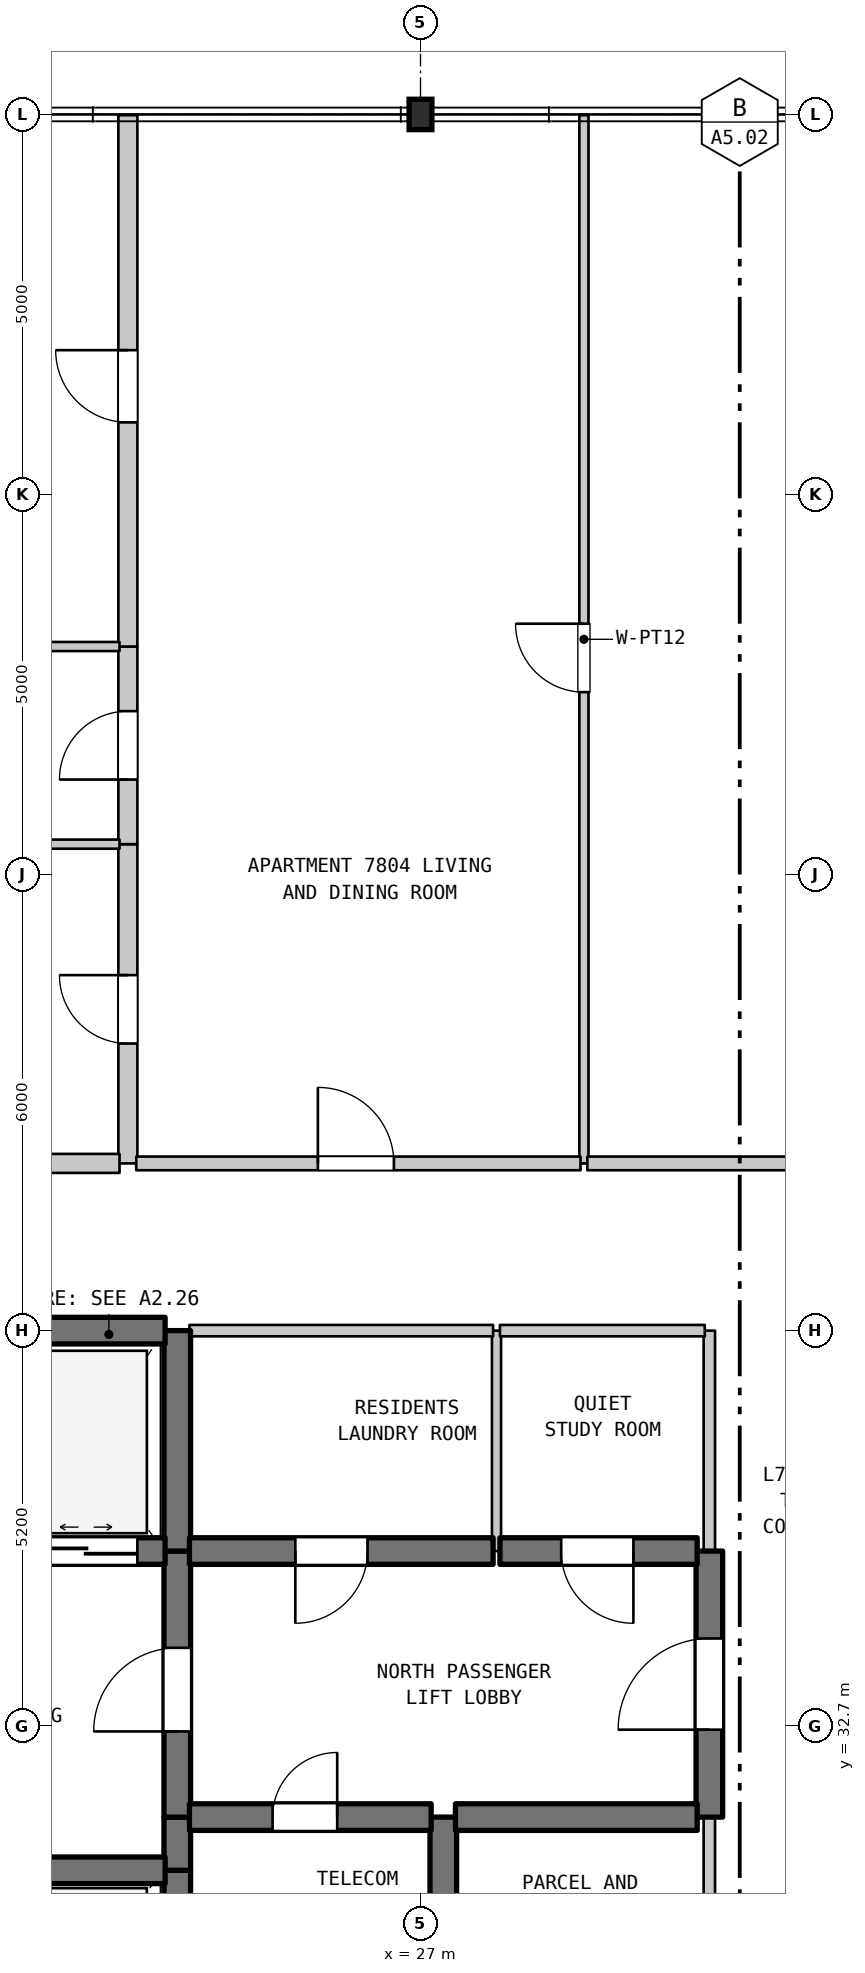
"""IFC4 building model, lengths in metres.
Left out: names, types, materials, properties, quantities, classifications, styles, units other than length and angle.
Written with IfcOpenShell. Run it as: python <this file> out.ifc"""

import sys

from ifc_helpers import new_model, si_unit, direction, frame, frame_2d, origin, origin_2d, place, context, subcontext, project, spatial, rectangle, i_section, extrude, element, fill, save


model = new_model("IFC4")
c1 = context("Model", 3, precision=1e-05, world=origin(), true_north=direction((0.0, 1.0)))
c2 = subcontext(c1, "Body", "Model", "MODEL_VIEW")
j1 = project(units=[si_unit("LENGTHUNIT", "METRE"), si_unit("PLANEANGLEUNIT", "RADIAN")], contexts=[c1])
p1 = place(None, origin())
s1 = spatial("IfcSite", under=j1, at=p1, CompositionType="ELEMENT")
p2 = place(p1, origin())
s2 = spatial("IfcBuilding", under=s1, at=p2, CompositionType="ELEMENT")
p3 = place(p2, frame((0.0, 0.0, 311.0)))
s3 = spatial("IfcBuildingStorey", under=s2, at=p3, CompositionType="ELEMENT", Elevation=311.0)
p4 = place(p3, frame((27.0, 53.9, 0.0), z_axis=(0.0, 0.0, 1.0), x_axis=(1.0, 0.0, 0.0)))
e1 = element("IfcColumn", 1, at=p4, inside=s3, PredefinedType="COLUMN", context=c2, shape_type="SweptSolid", body=[
    extrude(i_section(OverallWidth=0.3, OverallDepth=0.4, WebThickness=0.013, FlangeThickness=0.024, FilletRadius=0.027, at=origin_2d()), origin(), (0.0, 0.0, 1.0), 3.7),
])
p5 = place(p3, frame((23.15, 40.1, 0.0), z_axis=(0.0, 0.0, 1.0), x_axis=(0.0, 1.0, 0.0)))
e2 = element("IfcWall", 2, at=p5, inside=s3, PredefinedType="STANDARD", context=c2, shape_type="SweptSolid", body=[
    extrude(rectangle(XDim=4.2, YDim=0.25, at=frame_2d((2.1, 0.0))), origin(), (0.0, 0.0, 1.0), 3.28),
])
p6 = place(p5, frame((1.577, 0.0, 0.0)))
e3 = element("IfcOpeningElement", 3, at=p6, cuts=e2, PredefinedType="OPENING", context=c2, shape_type="SweptSolid", body=[
    extrude(rectangle(XDim=0.9, YDim=2.15, at=frame_2d((0.45, 1.075))), frame((0.0, 0.135, 0.0), z_axis=(0.0, -1.0, 0.0), x_axis=(1.0, 0.0, 0.0)), (0.0, 0.0, 1.0), 0.27),
])
p7 = place(p3, frame((23.15, 44.3, 0.0), z_axis=(0.0, 0.0, 1.0), x_axis=(0.0, 1.0, 0.0)))
e4 = element("IfcWall", 4, at=p7, inside=s3, PredefinedType="STANDARD", context=c2, shape_type="SweptSolid", body=[
    extrude(rectangle(XDim=2.6, YDim=0.25, at=frame_2d((1.3, 0.0))), origin(), (0.0, 0.0, 1.0), 3.28),
])
p8 = place(p7, frame((0.85, 0.0, 0.0)))
e5 = element("IfcOpeningElement", 5, at=p8, cuts=e4, PredefinedType="OPENING", context=c2, shape_type="SweptSolid", body=[
    extrude(rectangle(XDim=0.9, YDim=2.1, at=frame_2d((0.45, 1.05))), frame((0.0, 0.135, 0.0), z_axis=(0.0, -1.0, 0.0), x_axis=(1.0, 0.0, 0.0)), (0.0, 0.0, 1.0), 0.27),
])
p9 = place(p3, frame((23.15, 46.9, 0.0), z_axis=(0.0, 0.0, 1.0), x_axis=(0.0, 1.0, 0.0)))
e6 = element("IfcWall", 6, at=p9, inside=s3, PredefinedType="STANDARD", context=c2, shape_type="SweptSolid", body=[
    extrude(rectangle(XDim=6.99, YDim=0.25, at=frame_2d((3.495, 0.0))), origin(), (0.0, 0.0, 1.0), 3.28),
])
p10 = place(p9, frame((2.949, 0.0, 0.0)))
e7 = element("IfcOpeningElement", 7, at=p10, cuts=e6, PredefinedType="OPENING", context=c2, shape_type="SweptSolid", body=[
    extrude(rectangle(XDim=0.95, YDim=2.15, at=frame_2d((0.475, 1.075))), frame((0.0, 0.135, 0.0), z_axis=(0.0, -1.0, 0.0), x_axis=(1.0, 0.0, 0.0)), (0.0, 0.0, 1.0), 0.27),
])
p11 = place(p3, frame((23.8, 28.2, 0.0), z_axis=(0.0, 0.0, 1.0), x_axis=(0.0, 1.0, 0.0)))
e8 = element("IfcWall", 8, at=p11, inside=s3, PredefinedType="SHEAR", context=c2, shape_type="SweptSolid", body=[
    extrude(rectangle(XDim=2.6, YDim=0.35, at=frame_2d((1.3, 0.0))), origin(), (0.0, 0.0, 1.0), 3.28),
])
p12 = place(p3, frame((23.8, 30.8, 0.0), z_axis=(0.0, 0.0, 1.0), x_axis=(0.0, 1.0, 0.0)))
e9 = element("IfcWall", 9, at=p12, inside=s3, PredefinedType="SHEAR", context=c2, shape_type="SweptSolid", body=[
    extrude(rectangle(XDim=0.7, YDim=0.35, at=frame_2d((0.35, 0.0))), origin(), (0.0, 0.0, 1.0), 3.28),
])
p13 = place(p3, frame((23.8, 31.5, 0.0), z_axis=(0.0, 0.0, 1.0), x_axis=(0.0, 1.0, 0.0)))
e10 = element("IfcWall", 10, at=p13, inside=s3, PredefinedType="SHEAR", context=c2, shape_type="SweptSolid", body=[
    extrude(rectangle(XDim=3.5, YDim=0.35, at=frame_2d((1.75, 0.0))), origin(), (0.0, 0.0, 1.0), 3.28),
])
p14 = place(p13, frame((1.127, 0.0, 0.0)))
e11 = element("IfcOpeningElement", 11, at=p14, cuts=e10, PredefinedType="OPENING", context=c2, shape_type="SweptSolid", body=[
    extrude(rectangle(XDim=1.1, YDim=2.15, at=frame_2d((0.55, 1.075))), frame((0.0, 0.185, 0.0), z_axis=(0.0, -1.0, 0.0), x_axis=(1.0, 0.0, 0.0)), (0.0, 0.0, 1.0), 0.37),
])
p15 = place(p3, frame((23.8, 35.0, 0.0), z_axis=(0.0, 0.0, 1.0), x_axis=(0.0, 1.0, 0.0)))
e12 = element("IfcWall", 12, at=p15, inside=s3, PredefinedType="SHEAR", context=c2, shape_type="SweptSolid", body=[
    extrude(rectangle(XDim=2.9, YDim=0.35, at=frame_2d((1.45, 0.0))), origin(), (0.0, 0.0, 1.0), 3.28),
])
p16 = place(p3, frame((27.3, 28.9, 0.0), z_axis=(0.0, 0.0, 1.0), x_axis=(0.0, 1.0, 0.0)))
e13 = element("IfcWall", 13, at=p16, inside=s3, PredefinedType="SHEAR", context=c2, shape_type="SweptSolid", body=[
    extrude(rectangle(XDim=2.6, YDim=0.35, at=frame_2d((1.3, 0.0))), origin(), (0.0, 0.0, 1.0), 3.28),
])
p17 = place(p3, frame((28.0, 35.0, 0.0), z_axis=(0.0, 0.0, 1.0), x_axis=(0.0, 1.0, 0.0)))
e14 = element("IfcWall", 14, at=p17, inside=s3, PredefinedType="PARTITIONING", context=c2, shape_type="SweptSolid", body=[
    extrude(rectangle(XDim=2.9, YDim=0.12, at=frame_2d((1.45, 0.0))), origin(), (0.0, 0.0, 1.0), 3.28),
])
p18 = place(p3, frame((29.15, 40.1, 0.0), z_axis=(0.0, 0.0, 1.0), x_axis=(0.0, 1.0, 0.0)))
e15 = element("IfcWall", 15, at=p18, inside=s3, PredefinedType="PARTITIONING", context=c2, shape_type="SweptSolid", body=[
    extrude(rectangle(XDim=13.79, YDim=0.12, at=frame_2d((6.895, 0.0))), origin(), (0.0, 0.0, 1.0), 3.28),
])
p19 = place(p18, frame((6.2, 0.0, 0.0)))
e16 = element("IfcOpeningElement", 16, at=p19, cuts=e15, PredefinedType="OPENING", context=c2, shape_type="SweptSolid", body=[
    extrude(rectangle(XDim=0.9, YDim=2.15, at=frame_2d((0.45, 1.075))), frame((0.0, 0.07, 0.0), z_axis=(0.0, -1.0, 0.0), x_axis=(1.0, 0.0, 0.0)), (0.0, 0.0, 1.0), 0.14),
])
p20 = place(p3, frame((30.8, 28.9, 0.0), z_axis=(0.0, 0.0, 1.0), x_axis=(0.0, 1.0, 0.0)))
e17 = element("IfcWall", 17, at=p20, inside=s3, PredefinedType="STANDARD", context=c2, shape_type="SweptSolid", body=[
    extrude(rectangle(XDim=2.6, YDim=0.15, at=frame_2d((1.3, 0.0))), origin(), (0.0, 0.0, 1.0), 3.28),
])
p21 = place(p3, frame((30.8, 31.5, 0.0), z_axis=(0.0, 0.0, 1.0), x_axis=(0.0, 1.0, 0.0)))
e18 = element("IfcWall", 18, at=p21, inside=s3, PredefinedType="SHEAR", context=c2, shape_type="SweptSolid", body=[
    extrude(rectangle(XDim=3.5, YDim=0.35, at=frame_2d((1.75, 0.0))), origin(), (0.0, 0.0, 1.0), 3.28),
])
p22 = place(p21, frame((1.15, 0.0, 0.0)))
e19 = element("IfcOpeningElement", 19, at=p22, cuts=e18, PredefinedType="OPENING", context=c2, shape_type="SweptSolid", body=[
    extrude(rectangle(XDim=1.2, YDim=2.2, at=frame_2d((0.6, 1.1))), frame((0.0, 0.185, 0.0), z_axis=(0.0, -1.0, 0.0), x_axis=(1.0, 0.0, 0.0)), (0.0, 0.0, 1.0), 0.37),
])
p23 = place(p3, frame((30.8, 35.0, 0.0), z_axis=(0.0, 0.0, 1.0), x_axis=(0.0, 1.0, 0.0)))
e20 = element("IfcWall", 20, at=p23, inside=s3, PredefinedType="STANDARD", context=c2, shape_type="SweptSolid", body=[
    extrude(rectangle(XDim=2.9, YDim=0.15, at=frame_2d((1.45, 0.0))), origin(), (0.0, 0.0, 1.0), 3.28),
])
p24 = place(p3, frame((19.16, 30.8, 0.0), z_axis=(0.0, 0.0, 1.0), x_axis=(1.0, 0.0, 0.0)))
e21 = element("IfcWall", 21, at=p24, inside=s3, PredefinedType="SHEAR", context=c2, shape_type="SweptSolid", body=[
    extrude(rectangle(XDim=4.48, YDim=0.35, at=frame_2d((2.24, 0.0))), origin(), (0.0, 0.0, 1.0), 3.28),
])
p25 = place(p3, frame((23.96, 31.5, 0.0), z_axis=(0.0, 0.0, 1.0), x_axis=(1.0, 0.0, 0.0)))
e22 = element("IfcWall", 22, at=p25, inside=s3, PredefinedType="SHEAR", context=c2, shape_type="SweptSolid", body=[
    extrude(rectangle(XDim=3.18, YDim=0.35, at=frame_2d((1.59, 0.0))), origin(), (0.0, 0.0, 1.0), 3.28),
])
p26 = place(p25, frame((1.094, 0.0, 0.0)))
e23 = element("IfcOpeningElement", 23, at=p26, cuts=e22, PredefinedType="OPENING", context=c2, shape_type="SweptSolid", body=[
    extrude(rectangle(XDim=0.85, YDim=2.1, at=frame_2d((0.425, 1.05))), frame((0.0, 0.185, 0.0), z_axis=(0.0, -1.0, 0.0), x_axis=(1.0, 0.0, 0.0)), (0.0, 0.0, 1.0), 0.37),
])
p27 = place(p3, frame((27.46, 31.5, 0.0), z_axis=(0.0, 0.0, 1.0), x_axis=(1.0, 0.0, 0.0)))
e24 = element("IfcWall", 24, at=p27, inside=s3, PredefinedType="SHEAR", context=c2, shape_type="SweptSolid", body=[
    extrude(rectangle(XDim=3.18, YDim=0.35, at=frame_2d((1.59, 0.0))), origin(), (0.0, 0.0, 1.0), 3.28),
])
p28 = place(p3, frame((19.16, 35.0, 0.0), z_axis=(0.0, 0.0, 1.0), x_axis=(1.0, 0.0, 0.0)))
e25 = element("IfcWall", 25, at=p28, inside=s3, PredefinedType="SHEAR", context=c2, shape_type="SweptSolid", body=[
    extrude(rectangle(XDim=4.48, YDim=0.35, at=frame_2d((2.24, 0.0))), origin(), (0.0, 0.0, 1.0), 3.28),
])
p29 = place(p28, frame((0.365, 0.0, 0.0)))
e26 = element("IfcOpeningElement", 26, at=p29, cuts=e25, PredefinedType="OPENING", context=c2, shape_type="SweptSolid", body=[
    extrude(rectangle(XDim=1.35, YDim=2.2, at=frame_2d((0.675, 1.1))), frame((0.0, 0.185, 0.0), z_axis=(0.0, -1.0, 0.0), x_axis=(1.0, 0.0, 0.0)), (0.0, 0.0, 1.0), 0.37),
])
p30 = place(p28, frame((2.765, 0.0, 0.0)))
e27 = element("IfcOpeningElement", 27, at=p30, cuts=e25, PredefinedType="OPENING", context=c2, shape_type="SweptSolid", body=[
    extrude(rectangle(XDim=1.35, YDim=2.2, at=frame_2d((0.675, 1.1))), frame((0.0, 0.185, 0.0), z_axis=(0.0, -1.0, 0.0), x_axis=(1.0, 0.0, 0.0)), (0.0, 0.0, 1.0), 0.37),
])
p31 = place(p3, frame((23.96, 35.0, 0.0), z_axis=(0.0, 0.0, 1.0), x_axis=(1.0, 0.0, 0.0)))
e28 = element("IfcWall", 28, at=p31, inside=s3, PredefinedType="SHEAR", context=c2, shape_type="SweptSolid", body=[
    extrude(rectangle(XDim=3.995, YDim=0.35, at=frame_2d((1.998, 0.0))), origin(), (0.0, 0.0, 1.0), 3.28),
])
p32 = place(p31, frame((1.393, 0.0, 0.0)))
e29 = element("IfcOpeningElement", 29, at=p32, cuts=e28, PredefinedType="OPENING", context=c2, shape_type="SweptSolid", body=[
    extrude(rectangle(XDim=0.95, YDim=2.15, at=frame_2d((0.475, 1.075))), frame((0.0, 0.185, 0.0), z_axis=(0.0, -1.0, 0.0), x_axis=(1.0, 0.0, 0.0)), (0.0, 0.0, 1.0), 0.37),
])
p33 = place(p3, frame((28.045, 35.0, 0.0), z_axis=(0.0, 0.0, 1.0), x_axis=(1.0, 0.0, 0.0)))
e30 = element("IfcWall", 30, at=p33, inside=s3, PredefinedType="SHEAR", context=c2, shape_type="SweptSolid", body=[
    extrude(rectangle(XDim=2.595, YDim=0.35, at=frame_2d((1.297, 0.0))), origin(), (0.0, 0.0, 1.0), 3.28),
])
p34 = place(p33, frame((0.806, 0.0, 0.0)))
e31 = element("IfcOpeningElement", 31, at=p34, cuts=e30, PredefinedType="OPENING", context=c2, shape_type="SweptSolid", body=[
    extrude(rectangle(XDim=0.95, YDim=2.15, at=frame_2d((0.475, 1.075))), frame((0.0, 0.185, 0.0), z_axis=(0.0, -1.0, 0.0), x_axis=(1.0, 0.0, 0.0)), (0.0, 0.0, 1.0), 0.37),
])
p35 = place(p3, frame((19.16, 37.9, 0.0), z_axis=(0.0, 0.0, 1.0), x_axis=(1.0, 0.0, 0.0)))
e32 = element("IfcWall", 32, at=p35, inside=s3, PredefinedType="SHEAR", context=c2, shape_type="SweptSolid", body=[
    extrude(rectangle(XDim=4.48, YDim=0.35, at=frame_2d((2.24, 0.0))), origin(), (0.0, 0.0, 1.0), 3.28),
])
p36 = place(p3, frame((23.96, 37.9, 0.0), z_axis=(0.0, 0.0, 1.0), x_axis=(1.0, 0.0, 0.0)))
e33 = element("IfcWall", 33, at=p36, inside=s3, PredefinedType="STANDARD", context=c2, shape_type="SweptSolid", body=[
    extrude(rectangle(XDim=3.995, YDim=0.15, at=frame_2d((1.998, 0.0))), origin(), (0.0, 0.0, 1.0), 2.78),
])
p37 = place(p3, frame((28.045, 37.9, 0.0), z_axis=(0.0, 0.0, 1.0), x_axis=(1.0, 0.0, 0.0)))
e34 = element("IfcWall", 34, at=p37, inside=s3, PredefinedType="STANDARD", context=c2, shape_type="SweptSolid", body=[
    extrude(rectangle(XDim=2.695, YDim=0.15, at=frame_2d((1.348, 0.0))), origin(), (0.0, 0.0, 1.0), 2.78),
])
p38 = place(p3, frame((14.545, 40.1, 0.0), z_axis=(0.0, 0.0, 1.0), x_axis=(1.0, 0.0, 0.0)))
e35 = element("IfcWall", 35, at=p38, inside=s3, PredefinedType="STANDARD", context=c2, shape_type="SweptSolid", body=[
    extrude(rectangle(XDim=8.495, YDim=0.25, at=frame_2d((4.248, 0.0))), origin(), (0.0, 0.0, 1.0), 3.28),
])
p39 = place(p3, frame((23.26, 40.1, 0.0), z_axis=(0.0, 0.0, 1.0), x_axis=(1.0, 0.0, 0.0)))
e36 = element("IfcWall", 36, at=p39, inside=s3, PredefinedType="STANDARD", context=c2, shape_type="SweptSolid", body=[
    extrude(rectangle(XDim=5.845, YDim=0.18, at=frame_2d((2.922, 0.0))), origin(), (0.0, 0.0, 1.0), 3.28),
])
p40 = place(p39, frame((2.39, 0.0, 0.0)))
e37 = element("IfcOpeningElement", 37, at=p40, cuts=e36, PredefinedType="OPENING", context=c2, shape_type="SweptSolid", body=[
    extrude(rectangle(XDim=1.0, YDim=2.15, at=frame_2d((0.5, 1.075))), frame((0.0, 0.1, 0.0), z_axis=(0.0, -1.0, 0.0), x_axis=(1.0, 0.0, 0.0)), (0.0, 0.0, 1.0), 0.2),
])
p41 = place(p3, frame((29.195, 40.1, 0.0), z_axis=(0.0, 0.0, 1.0), x_axis=(1.0, 0.0, 0.0)))
e38 = element("IfcWall", 38, at=p41, inside=s3, PredefinedType="STANDARD", context=c2, shape_type="SweptSolid", body=[
    extrude(rectangle(XDim=3.73, YDim=0.18, at=frame_2d((1.865, 0.0))), origin(), (0.0, 0.0, 1.0), 3.28),
])
for number, where, z_axis, x_axis in (
    (39, (14.545, 44.3, 0.0), (0.0, 0.0, 1.0), (1.0, 0.0, 0.0)),
    (40, (14.545, 46.9, 0.0), (0.0, 0.0, 1.0), (1.0, 0.0, 0.0)),
):
    element("IfcWall", number, at=place(p3, frame(where, z_axis=z_axis, x_axis=x_axis)), inside=s3, PredefinedType="PARTITIONING", context=c2, shape_type="SweptSolid", body=[
        extrude(rectangle(XDim=8.495, YDim=0.12, at=frame_2d((4.248, 0.0))), origin(), (0.0, 0.0, 1.0), 3.28),
    ])
p42 = place(p6, origin())
e41 = element("IfcDoor", 41, at=p42, inside=s3, OperationType="SINGLE_SWING_RIGHT", PredefinedType="DOOR", context=c2, shape_type="SweptSolid", body=[
    extrude(rectangle(XDim=0.9, YDim=2.15, at=frame_2d((0.45, 1.075))), frame((0.0, 0.025, 0.0), z_axis=(0.0, -1.0, 0.0), x_axis=(1.0, 0.0, 0.0)), (0.0, 0.0, 1.0), 0.05),
])
fill(e3, e41)
p43 = place(p8, origin())
e42 = element("IfcDoor", 42, at=p43, inside=s3, OperationType="SINGLE_SWING_LEFT", PredefinedType="DOOR", context=c2, shape_type="SweptSolid", body=[
    extrude(rectangle(XDim=0.9, YDim=2.1, at=frame_2d((0.45, 1.05))), frame((0.0, 0.025, 0.0), z_axis=(0.0, -1.0, 0.0), x_axis=(1.0, 0.0, 0.0)), (0.0, 0.0, 1.0), 0.05),
])
fill(e5, e42)
p44 = place(p10, origin())
e43 = element("IfcDoor", 43, at=p44, inside=s3, OperationType="SINGLE_SWING_RIGHT", PredefinedType="DOOR", context=c2, shape_type="SweptSolid", body=[
    extrude(rectangle(XDim=0.95, YDim=2.15, at=frame_2d((0.475, 1.075))), frame((0.0, 0.025, 0.0), z_axis=(0.0, -1.0, 0.0), x_axis=(1.0, 0.0, 0.0)), (0.0, 0.0, 1.0), 0.05),
])
fill(e7, e43)
p45 = place(p14, origin())
e44 = element("IfcDoor", 44, at=p45, inside=s3, OperationType="SINGLE_SWING_LEFT", PredefinedType="DOOR", context=c2, shape_type="SweptSolid", body=[
    extrude(rectangle(XDim=1.1, YDim=2.15, at=frame_2d((0.55, 1.075))), frame((0.0, 0.025, 0.0), z_axis=(0.0, -1.0, 0.0), x_axis=(1.0, 0.0, 0.0)), (0.0, 0.0, 1.0), 0.05),
])
fill(e11, e44)
p46 = place(p19, origin())
e45 = element("IfcDoor", 45, at=p46, inside=s3, OperationType="SINGLE_SWING_RIGHT", PredefinedType="DOOR", context=c2, shape_type="SweptSolid", body=[
    extrude(rectangle(XDim=0.9, YDim=2.15, at=frame_2d((0.45, 1.075))), frame((0.0, 0.025, 0.0), z_axis=(0.0, -1.0, 0.0), x_axis=(1.0, 0.0, 0.0)), (0.0, 0.0, 1.0), 0.05),
])
fill(e16, e45)
p47 = place(p22, origin())
e46 = element("IfcDoor", 46, at=p47, inside=s3, OperationType="SINGLE_SWING_LEFT", PredefinedType="DOOR", context=c2, shape_type="SweptSolid", body=[
    extrude(rectangle(XDim=1.2, YDim=2.2, at=frame_2d((0.6, 1.1))), frame((0.0, 0.025, 0.0), z_axis=(0.0, -1.0, 0.0), x_axis=(1.0, 0.0, 0.0)), (0.0, 0.0, 1.0), 0.05),
])
fill(e19, e46)
p48 = place(p26, origin())
e47 = element("IfcDoor", 47, at=p48, inside=s3, OperationType="SINGLE_SWING_RIGHT", PredefinedType="DOOR", context=c2, shape_type="SweptSolid", body=[
    extrude(rectangle(XDim=0.85, YDim=2.1, at=frame_2d((0.425, 1.05))), frame((0.0, 0.025, 0.0), z_axis=(0.0, -1.0, 0.0), x_axis=(1.0, 0.0, 0.0)), (0.0, 0.0, 1.0), 0.05),
])
fill(e23, e47)
p49 = place(p30, origin())
e48 = element("IfcDoor", 48, at=p49, inside=s3, OperationType="DOUBLE_DOOR_SLIDING", PredefinedType="DOOR", context=c2, shape_type="SweptSolid", body=[
    extrude(rectangle(XDim=1.35, YDim=2.2, at=frame_2d((0.675, 1.1))), frame((0.0, 0.025, 0.0), z_axis=(0.0, -1.0, 0.0), x_axis=(1.0, 0.0, 0.0)), (0.0, 0.0, 1.0), 0.05),
])
fill(e27, e48)
p50 = place(p32, frame((0.95, 0.0, 0.0), z_axis=(0.0, 0.0, 1.0), x_axis=(-1.0, 0.0, 0.0)))
e49 = element("IfcDoor", 49, at=p50, inside=s3, OperationType="SINGLE_SWING_LEFT", PredefinedType="DOOR", context=c2, shape_type="SweptSolid", body=[
    extrude(rectangle(XDim=0.95, YDim=2.15, at=frame_2d((0.475, 1.075))), frame((0.0, 0.025, 0.0), z_axis=(0.0, -1.0, 0.0), x_axis=(1.0, 0.0, 0.0)), (0.0, 0.0, 1.0), 0.05),
])
fill(e29, e49)
p51 = place(p34, frame((0.95, 0.0, 0.0), z_axis=(0.0, 0.0, 1.0), x_axis=(-1.0, 0.0, 0.0)))
e50 = element("IfcDoor", 50, at=p51, inside=s3, OperationType="SINGLE_SWING_RIGHT", PredefinedType="DOOR", context=c2, shape_type="SweptSolid", body=[
    extrude(rectangle(XDim=0.95, YDim=2.15, at=frame_2d((0.475, 1.075))), frame((0.0, 0.025, 0.0), z_axis=(0.0, -1.0, 0.0), x_axis=(1.0, 0.0, 0.0)), (0.0, 0.0, 1.0), 0.05),
])
fill(e31, e50)
p52 = place(p40, origin())
e51 = element("IfcDoor", 51, at=p52, inside=s3, OperationType="SINGLE_SWING_LEFT", PredefinedType="DOOR", context=c2, shape_type="SweptSolid", body=[
    extrude(rectangle(XDim=1.0, YDim=2.15, at=frame_2d((0.5, 1.075))), frame((0.0, 0.025, 0.0), z_axis=(0.0, -1.0, 0.0), x_axis=(1.0, 0.0, 0.0)), (0.0, 0.0, 1.0), 0.05),
])
fill(e37, e51)
save(model, sys.argv[1])
